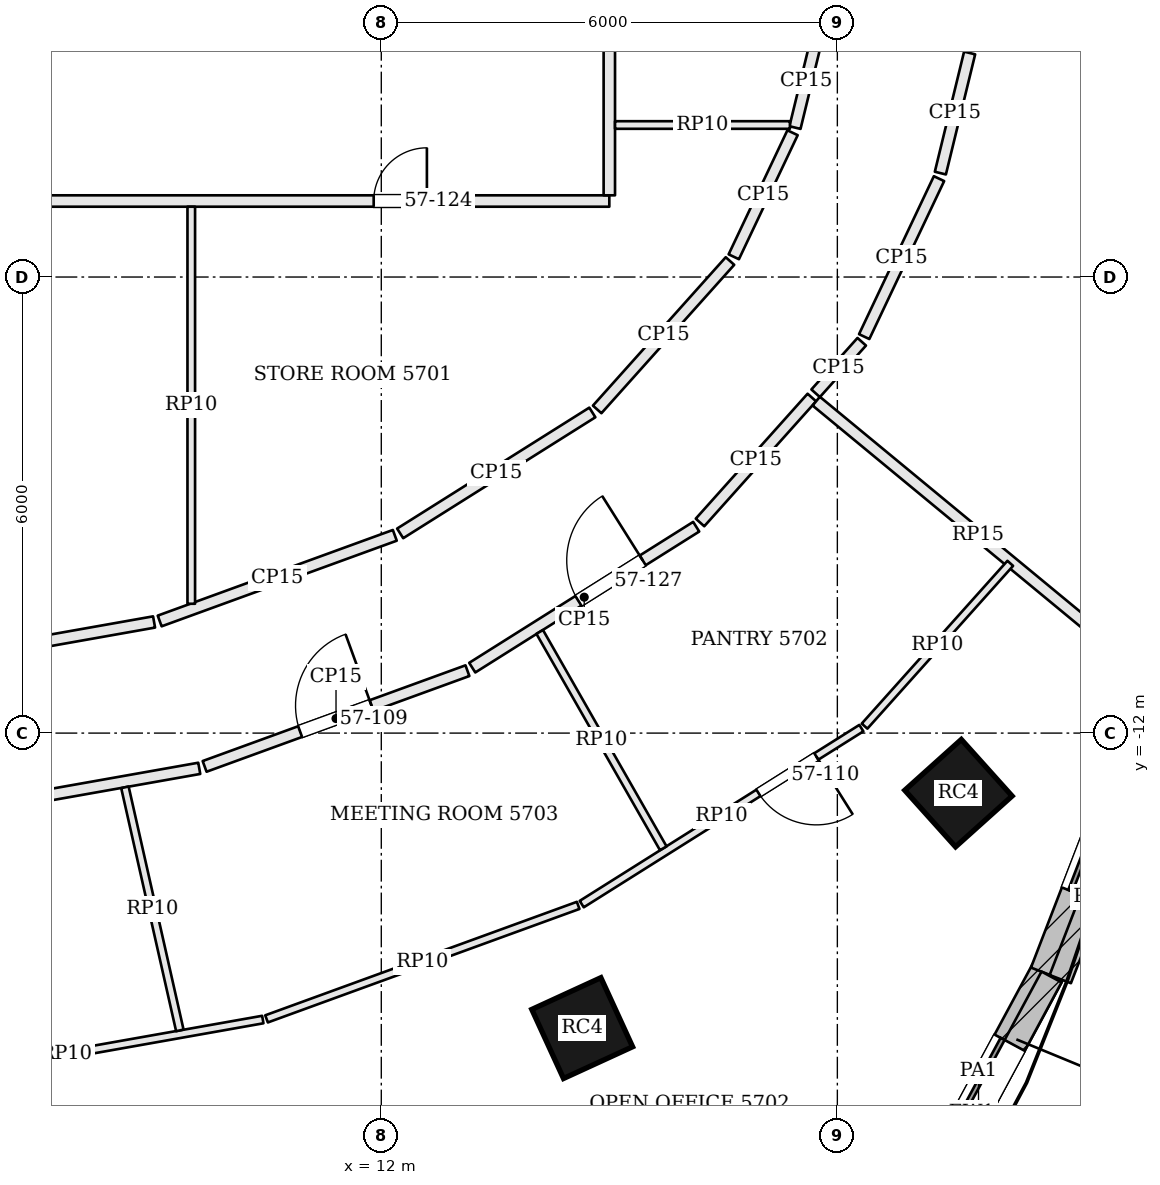
"""IFC4 building model, lengths in metres.
Left out: names, types, materials, properties, quantities, classifications, styles, units other than length and angle.
Written with IfcOpenShell. Run it as: python <this file> out.ifc"""

import sys

from ifc_helpers import new_model, si_unit, direction, frame, frame_2d, origin, origin_2d, place, context, subcontext, project, spatial, rectangle, extrude, element, fill, save


model = new_model("IFC4")
c1 = context("Model", 3, precision=1e-05, world=origin(), true_north=direction((0.0, 1.0)))
c2 = subcontext(c1, "Body", "Model", "MODEL_VIEW")
j1 = project(units=[si_unit("LENGTHUNIT", "METRE"), si_unit("PLANEANGLEUNIT", "RADIAN")], contexts=[c1])
p1 = place(None, origin())
s1 = spatial("IfcSite", under=j1, at=p1, CompositionType="ELEMENT")
p2 = place(p1, origin())
s2 = spatial("IfcBuilding", under=s1, at=p2, CompositionType="ELEMENT")
p3 = place(p2, frame((0.0, 0.0, 233.1)))
s3 = spatial("IfcBuildingStorey", under=s2, at=p3, CompositionType="ELEMENT", Elevation=233.1)
for number, where, z_axis, x_axis in (
    (1, (14.643, -15.881, 0.0), (0.0, 0.0, 1.0), (0.909, 0.417, 0.0)),
    (2, (19.593, -12.79, 0.0), (0.0, 0.0, 1.0), (0.744, 0.668, 0.0)),
):
    element("IfcColumn", number, at=place(p3, frame(where, z_axis=z_axis, x_axis=x_axis)), inside=s3, PredefinedType="COLUMN", context=c2, shape_type="SweptSolid", body=[
        extrude(rectangle(XDim=1.0, YDim=1.0, at=origin_2d()), origin(), (0.0, 0.0, 1.0), 3.9),
    ])
p4 = place(p3, frame((18.767, -18.854, 0.0), z_axis=(0.0, 0.0, 1.0), x_axis=(0.474475888716, 0.880268499395, 0.0)))
e3 = element("IfcWall", 3, at=p4, inside=s3, PredefinedType="SOLIDWALL", context=c2, shape_type="SweptSolid", body=[
    extrude(rectangle(XDim=4.219, YDim=0.45, at=frame_2d((2.11, 0.0))), origin(), (0.0, 0.0, 1.0), 3.7),
])
p5 = place(p4, frame((1.06, 0.0, 0.9)))
e4 = element("IfcOpeningElement", 4, at=p5, cuts=e3, PredefinedType="OPENING", context=c2, shape_type="SweptSolid", body=[
    extrude(rectangle(XDim=2.1, YDim=2.3, at=frame_2d((1.05, 1.15))), frame((0.0, 0.235, 0.0), z_axis=(0.0, -1.0, 0.0), x_axis=(1.0, 0.0, 0.0)), (0.0, 0.0, 1.0), 0.47),
])
p6 = place(p3, frame((20.757, -15.166, 0.0), z_axis=(0.0, 0.0, 1.0), x_axis=(0.360067043581, 0.932926430179, 0.0)))
e5 = element("IfcWall", 5, at=p6, inside=s3, PredefinedType="SOLIDWALL", context=c2, shape_type="SweptSolid", body=[
    extrude(rectangle(XDim=4.36, YDim=0.45, at=frame_2d((2.18, 0.0))), origin(), (0.0, 0.0, 1.0), 3.7),
])
p7 = place(p6, frame((1.13, 0.0, 0.9)))
e6 = element("IfcOpeningElement", 6, at=p7, cuts=e5, PredefinedType="OPENING", context=c2, shape_type="SweptSolid", body=[
    extrude(rectangle(XDim=2.1, YDim=2.3, at=frame_2d((1.05, 1.15))), frame((0.0, 0.235, 0.0), z_axis=(0.0, -1.0, 0.0), x_axis=(1.0, 0.0, 0.0)), (0.0, 0.0, 1.0), 0.47),
])
p8 = place(p3, frame((18.896, -18.773, 3.9), z_axis=(0.0, 0.0, 1.0), x_axis=(0.474444905835, 0.880285198857, 0.0)))
e7 = element("IfcWall", 7, at=p8, inside=s3, PredefinedType="PARAPET", context=c2, shape_type="SweptSolid", body=[
    extrude(rectangle(XDim=4.05, YDim=0.3, at=frame_2d((2.025, 0.0))), origin(), (0.0, 0.0, 1.0), 1.1),
])
p9 = place(p3, frame((20.933, -15.237, 3.9), z_axis=(0.0, 0.0, 1.0), x_axis=(0.360021038217, 0.932944184848, 0.0)))
e8 = element("IfcWall", 8, at=p9, inside=s3, PredefinedType="PARAPET", context=c2, shape_type="SweptSolid", body=[
    extrude(rectangle(XDim=2.323, YDim=0.3, at=frame_2d((1.162, 0.0))), origin(), (0.0, 0.0, 1.0), 1.1),
])
p10 = place(p3, frame((4.995, -13.281, 0.0), z_axis=(0.0, 0.0, 1.0), x_axis=(0.98463411377, 0.174630071865, 0.0)))
e9 = element("IfcWall", 9, at=p10, inside=s3, PredefinedType="PARTITIONING", context=c2, shape_type="SweptSolid", body=[
    extrude(rectangle(XDim=4.682, YDim=0.15, at=frame_2d((2.341, 0.0))), origin(), (0.0, 0.0, 1.0), 3.084),
])
p11 = place(p3, frame((9.676, -12.438, 0.0), z_axis=(0.0, 0.0, 1.0), x_axis=(0.939640289748, 0.342163887461, 0.0)))
e10 = element("IfcWall", 10, at=p11, inside=s3, PredefinedType="PARTITIONING", context=c2, shape_type="SweptSolid", body=[
    extrude(rectangle(XDim=3.68, YDim=0.15, at=frame_2d((1.84, 0.0))), origin(), (0.0, 0.0, 1.0), 3.084),
])
p12 = place(p11, frame((1.337, 0.0, 0.0)))
e11 = element("IfcOpeningElement", 11, at=p12, cuts=e10, PredefinedType="OPENING", context=c2, shape_type="SweptSolid", body=[
    extrude(rectangle(XDim=1.0, YDim=2.4, at=frame_2d((0.5, 1.2))), frame((0.0, 0.085, 0.0), z_axis=(0.0, -1.0, 0.0), x_axis=(1.0, 0.0, 0.0)), (0.0, 0.0, 1.0), 0.17),
])
p13 = place(p3, frame((13.197, -11.139, 0.0), z_axis=(0.0, 0.0, 1.0), x_axis=(0.846390903833, 0.532562144644, 0.0)))
e12 = element("IfcWall", 12, at=p13, inside=s3, PredefinedType="PARTITIONING", context=c2, shape_type="SweptSolid", body=[
    extrude(rectangle(XDim=3.481, YDim=0.15, at=frame_2d((1.741, 0.0))), origin(), (0.0, 0.0, 1.0), 3.084),
])
p14 = place(p13, frame((1.65, 0.0, 0.0)))
e13 = element("IfcOpeningElement", 13, at=p14, cuts=e12, PredefinedType="OPENING", context=c2, shape_type="SweptSolid", body=[
    extrude(rectangle(XDim=1.0, YDim=2.1, at=frame_2d((0.5, 1.05))), frame((0.0, 0.085, 0.0), z_axis=(0.0, -1.0, 0.0), x_axis=(1.0, 0.0, 0.0)), (0.0, 0.0, 1.0), 0.17),
])
p15 = place(p3, frame((16.193, -9.229, 0.0), z_axis=(0.0, 0.0, 1.0), x_axis=(0.666901607283, 0.745145788556, 0.0)))
e14 = element("IfcWall", 14, at=p15, inside=s3, PredefinedType="PARTITIONING", context=c2, shape_type="SweptSolid", body=[
    extrude(rectangle(XDim=2.206, YDim=0.15, at=frame_2d((1.103, 0.0))), origin(), (0.0, 0.0, 1.0), 3.084),
])
p16 = place(p3, frame((21.981, -11.15, 0.0), z_axis=(0.0, 0.0, 1.0), x_axis=(-0.771133462492, 0.63667352939, 0.0)))
e15 = element("IfcWall", 15, at=p16, inside=s3, PredefinedType="PARTITIONING", context=c2, shape_type="SweptSolid", body=[
    extrude(rectangle(XDim=5.523, YDim=0.15, at=frame_2d((2.762, 0.0))), origin(), (0.0, 0.0, 1.0), 3.084),
])
p17 = place(p3, frame((17.714, -7.529, 0.0), z_axis=(0.0, 0.0, 1.0), x_axis=(0.666975287656, 0.745079838444, 0.0)))
e16 = element("IfcWall", 16, at=p17, inside=s3, PredefinedType="PARTITIONING", context=c2, shape_type="SweptSolid", body=[
    extrude(rectangle(XDim=0.91, YDim=0.15, at=frame_2d((0.455, 0.0))), origin(), (0.0, 0.0, 1.0), 3.084),
])
p18 = place(p3, frame((18.353, -6.784, 0.0), z_axis=(0.0, 0.0, 1.0), x_axis=(0.428086344739, 0.903737838894, 0.0)))
e17 = element("IfcWall", 17, at=p18, inside=s3, PredefinedType="PARTITIONING", context=c2, shape_type="SweptSolid", body=[
    extrude(rectangle(XDim=2.3, YDim=0.15, at=frame_2d((1.15, 0.0))), origin(), (0.0, 0.0, 1.0), 3.084),
])
p19 = place(p3, frame((19.355, -4.633, 0.0), z_axis=(0.0, 0.0, 1.0), x_axis=(0.236703930685, 0.971581828359, 0.0)))
e18 = element("IfcWall", 18, at=p19, inside=s3, PredefinedType="PARTITIONING", context=c2, shape_type="SweptSolid", body=[
    extrude(rectangle(XDim=1.626, YDim=0.15, at=frame_2d((0.813, 0.0))), origin(), (0.0, 0.0, 1.0), 3.084),
])
p20 = place(p3, frame((17.739, -2.818, 0.0), z_axis=(0.0, 0.0, 1.0), x_axis=(-0.236884307907, -0.971537865792, 0.0)))
e19 = element("IfcWall", 19, at=p20, inside=s3, PredefinedType="PARTITIONING", context=c2, shape_type="SweptSolid", body=[
    extrude(rectangle(XDim=1.251, YDim=0.15, at=frame_2d((0.625, 0.0))), origin(), (0.0, 0.0, 1.0), 3.084),
])
p21 = place(p3, frame((17.41, -4.102, 0.0), z_axis=(0.0, 0.0, 1.0), x_axis=(-0.428074720318, -0.903743345107, 0.0)))
e20 = element("IfcWall", 20, at=p21, inside=s3, PredefinedType="PARTITIONING", context=c2, shape_type="SweptSolid", body=[
    extrude(rectangle(XDim=1.806, YDim=0.15, at=frame_2d((0.903, 0.0))), origin(), (0.0, 0.0, 1.0), 3.084),
])
p22 = place(p3, frame((16.587, -5.789, 0.0), z_axis=(0.0, 0.0, 1.0), x_axis=(-0.666887460656, -0.745158449472, 0.0)))
e21 = element("IfcWall", 21, at=p22, inside=s3, PredefinedType="PARTITIONING", context=c2, shape_type="SweptSolid", body=[
    extrude(rectangle(XDim=2.62, YDim=0.15, at=frame_2d((1.31, 0.0))), origin(), (0.0, 0.0, 1.0), 3.084),
])
p23 = place(p3, frame((14.777, -7.781, 0.0), z_axis=(0.0, 0.0, 1.0), x_axis=(-0.846359741043, -0.532611667862, 0.0)))
e22 = element("IfcWall", 22, at=p23, inside=s3, PredefinedType="PARTITIONING", context=c2, shape_type="SweptSolid", body=[
    extrude(rectangle(XDim=2.987, YDim=0.15, at=frame_2d((1.494, 0.0))), origin(), (0.0, 0.0, 1.0), 3.084),
])
p24 = place(p3, frame((12.178, -9.398, 0.0), z_axis=(0.0, 0.0, 1.0), x_axis=(-0.939609240084, -0.342249143093, 0.0)))
e23 = element("IfcWall", 23, at=p24, inside=s3, PredefinedType="PARTITIONING", context=c2, shape_type="SweptSolid", body=[
    extrude(rectangle(XDim=3.292, YDim=0.15, at=frame_2d((1.646, 0.0))), origin(), (0.0, 0.0, 1.0), 3.084),
])
p25 = place(p3, frame((9.01, -10.538, 0.0), z_axis=(0.0, 0.0, 1.0), x_axis=(-0.984645638575, -0.174565077936, 0.0)))
e24 = element("IfcWall", 24, at=p25, inside=s3, PredefinedType="PARTITIONING", context=c2, shape_type="SweptSolid", body=[
    extrude(rectangle(XDim=4.358, YDim=0.15, at=frame_2d((2.179, 0.0))), origin(), (0.0, 0.0, 1.0), 3.084),
])
p26 = place(p3, frame((-14.925, -5.0, 0.0), z_axis=(0.0, 0.0, 1.0), x_axis=(1.0, 0.0, 0.0)))
e25 = element("IfcWall", 25, at=p26, inside=s3, PredefinedType="PARTITIONING", context=c2, shape_type="SweptSolid", body=[
    extrude(rectangle(XDim=29.925, YDim=0.15, at=frame_2d((14.962, 0.0))), origin(), (0.0, 0.0, 1.0), 3.084),
])
p27 = place(p26, frame((2.175, 0.0, 0.0)))
e26 = element("IfcOpeningElement", 26, at=p27, cuts=e25, PredefinedType="OPENING", context=c2, shape_type="SweptSolid", body=[
    extrude(rectangle(XDim=1.0, YDim=2.4, at=frame_2d((0.5, 1.2))), frame((0.0, 0.085, 0.0), z_axis=(0.0, -1.0, 0.0), x_axis=(1.0, 0.0, 0.0)), (0.0, 0.0, 1.0), 0.17),
])
p28 = place(p26, frame((14.025, 0.0, 0.0)))
e27 = element("IfcOpeningElement", 27, at=p28, cuts=e25, PredefinedType="OPENING", context=c2, shape_type="SweptSolid", body=[
    extrude(rectangle(XDim=1.8, YDim=2.1, at=frame_2d((0.9, 1.05))), frame((0.0, 0.085, 0.0), z_axis=(0.0, -1.0, 0.0), x_axis=(1.0, 0.0, 0.0)), (0.0, 0.0, 1.0), 0.17),
])
p29 = place(p26, frame((26.825, 0.0, 0.0)))
e28 = element("IfcOpeningElement", 28, at=p29, cuts=e25, PredefinedType="OPENING", context=c2, shape_type="SweptSolid", body=[
    extrude(rectangle(XDim=0.7, YDim=2.1, at=frame_2d((0.35, 1.05))), frame((0.0, 0.085, 0.0), z_axis=(0.0, -1.0, 0.0), x_axis=(1.0, 0.0, 0.0)), (0.0, 0.0, 1.0), 0.17),
])
p30 = place(p3, frame((15.0, -4.925, 0.0), z_axis=(0.0, 0.0, 1.0), x_axis=(0.0, 1.0, 0.0)))
e29 = element("IfcWall", 29, at=p30, inside=s3, PredefinedType="PARTITIONING", context=c2, shape_type="SweptSolid", body=[
    extrude(rectangle(XDim=12.583, YDim=0.15, at=frame_2d((6.292, 0.0))), origin(), (0.0, 0.0, 1.0), 3.084),
])
p31 = place(p30, frame((6.291, 0.0, 0.0)))
e30 = element("IfcOpeningElement", 30, at=p31, cuts=e29, PredefinedType="OPENING", context=c2, shape_type="SweptSolid", body=[
    extrude(rectangle(XDim=1.0, YDim=2.1, at=frame_2d((0.5, 1.05))), frame((0.0, 0.085, 0.0), z_axis=(0.0, -1.0, 0.0), x_axis=(1.0, 0.0, 0.0)), (0.0, 0.0, 1.0), 0.17),
])
p32 = place(p3, frame((20.275, -9.767, 0.0), z_axis=(0.0, 0.0, 1.0), x_axis=(-0.66695374861, -0.745099119054, 0.0)))
e31 = element("IfcWall", 31, at=p32, inside=s3, PredefinedType="PARTITIONING", context=c2, shape_type="SweptSolid", body=[
    extrude(rectangle(XDim=2.874, YDim=0.1, at=frame_2d((1.437, 0.0))), origin(), (0.0, 0.0, 1.0), 3.084),
])
p33 = place(p3, frame((18.316, -11.935, 0.0), z_axis=(0.0, 0.0, 1.0), x_axis=(-0.84637539713, -0.532586788358, 0.0)))
e32 = element("IfcWall", 32, at=p33, inside=s3, PredefinedType="PARTITIONING", context=c2, shape_type="SweptSolid", body=[
    extrude(rectangle(XDim=4.346, YDim=0.1, at=frame_2d((2.173, 0.0))), origin(), (0.0, 0.0, 1.0), 3.084),
])
p34 = place(p33, frame((0.7, 0.0, 0.0)))
e33 = element("IfcOpeningElement", 33, at=p34, cuts=e32, PredefinedType="OPENING", context=c2, shape_type="SweptSolid", body=[
    extrude(rectangle(XDim=0.9, YDim=2.1, at=frame_2d((0.45, 1.05))), frame((0.0, 0.06, 0.0), z_axis=(0.0, -1.0, 0.0), x_axis=(1.0, 0.0, 0.0)), (0.0, 0.0, 1.0), 0.12),
])
p35 = place(p3, frame((14.59, -14.267, 0.0), z_axis=(0.0, 0.0, 1.0), x_axis=(-0.939623405418, -0.342210251148, 0.0)))
e34 = element("IfcWall", 34, at=p35, inside=s3, PredefinedType="PARTITIONING", context=c2, shape_type="SweptSolid", body=[
    extrude(rectangle(XDim=4.363, YDim=0.1, at=frame_2d((2.182, 0.0))), origin(), (0.0, 0.0, 1.0), 3.084),
])
p36 = place(p3, frame((10.441, -15.769, 0.0), z_axis=(0.0, 0.0, 1.0), x_axis=(-0.984642067447, -0.174585219919, 0.0)))
e35 = element("IfcWall", 35, at=p36, inside=s3, PredefinedType="PARTITIONING", context=c2, shape_type="SweptSolid", body=[
    extrude(rectangle(XDim=5.258, YDim=0.1, at=frame_2d((2.629, 0.0))), origin(), (0.0, 0.0, 1.0), 3.084),
])
p37 = place(p3, frame((8.627, -12.713, 0.0), z_axis=(0.0, 0.0, 1.0), x_axis=(0.220343151244, -0.975422419109, 0.0)))
e36 = element("IfcWall", 36, at=p37, inside=s3, PredefinedType="PARTITIONING", context=c2, shape_type="SweptSolid", body=[
    extrude(rectangle(XDim=3.279, YDim=0.1, at=frame_2d((1.639, 0.0))), origin(), (0.0, 0.0, 1.0), 3.084),
])
p38 = place(p3, frame((14.084, -10.669, 0.0), z_axis=(0.0, 0.0, 1.0), x_axis=(0.495922375445, -0.868366856538, 0.0)))
e37 = element("IfcWall", 37, at=p38, inside=s3, PredefinedType="PARTITIONING", context=c2, shape_type="SweptSolid", body=[
    extrude(rectangle(XDim=3.278, YDim=0.1, at=frame_2d((1.639, 0.0))), origin(), (0.0, 0.0, 1.0), 3.084),
])
p39 = place(p3, frame((9.5, -10.299, 0.0), z_axis=(0.0, 0.0, 1.0), x_axis=(0.0, 1.0, 0.0)))
e38 = element("IfcWall", 38, at=p39, inside=s3, PredefinedType="PARTITIONING", context=c2, shape_type="SweptSolid", body=[
    extrude(rectangle(XDim=5.224, YDim=0.1, at=frame_2d((2.612, 0.0))), origin(), (0.0, 0.0, 1.0), 3.084),
])
p40 = place(p3, frame((15.075, -4.0, 0.0), z_axis=(0.0, 0.0, 1.0), x_axis=(1.0, 0.0, 0.0)))
e39 = element("IfcWall", 39, at=p40, inside=s3, PredefinedType="PARTITIONING", context=c2, shape_type="SweptSolid", body=[
    extrude(rectangle(XDim=2.301, YDim=0.1, at=frame_2d((1.15, 0.0))), origin(), (0.0, 0.0, 1.0), 3.084),
])
p41 = place(p5, origin())
e40 = element("IfcWindow", 40, at=p41, inside=s3, PartitioningType="SINGLE_PANEL", PredefinedType="WINDOW", context=c2, shape_type="SweptSolid", body=[
    extrude(rectangle(XDim=2.1, YDim=2.3, at=frame_2d((1.05, 1.15))), frame((0.0, 0.135, 0.0), z_axis=(0.0, -1.0, 0.0), x_axis=(1.0, 0.0, 0.0)), (0.0, 0.0, 1.0), 0.06),
])
fill(e4, e40)
p42 = place(p7, origin())
e41 = element("IfcWindow", 41, at=p42, inside=s3, PartitioningType="SINGLE_PANEL", PredefinedType="WINDOW", context=c2, shape_type="SweptSolid", body=[
    extrude(rectangle(XDim=2.1, YDim=2.3, at=frame_2d((1.05, 1.15))), frame((0.0, 0.135, 0.0), z_axis=(0.0, -1.0, 0.0), x_axis=(1.0, 0.0, 0.0)), (0.0, 0.0, 1.0), 0.06),
])
fill(e6, e41)
p43 = place(p12, origin())
e42 = element("IfcDoor", 42, at=p43, inside=s3, OperationType="SINGLE_SWING_RIGHT", PredefinedType="DOOR", context=c2, shape_type="SweptSolid", body=[
    extrude(rectangle(XDim=1.0, YDim=2.4, at=frame_2d((0.5, 1.2))), frame((0.0, 0.025, 0.0), z_axis=(0.0, -1.0, 0.0), x_axis=(1.0, 0.0, 0.0)), (0.0, 0.0, 1.0), 0.05),
])
fill(e11, e42)
p44 = place(p34, origin())
e43 = element("IfcDoor", 43, at=p44, inside=s3, OperationType="SINGLE_SWING_LEFT", PredefinedType="DOOR", context=c2, shape_type="SweptSolid", body=[
    extrude(rectangle(XDim=0.9, YDim=2.1, at=frame_2d((0.45, 1.05))), frame((0.0, 0.025, 0.0), z_axis=(0.0, -1.0, 0.0), x_axis=(1.0, 0.0, 0.0)), (0.0, 0.0, 1.0), 0.05),
])
fill(e33, e43)
p45 = place(p29, origin())
e44 = element("IfcDoor", 44, at=p45, inside=s3, OperationType="SINGLE_SWING_RIGHT", PredefinedType="DOOR", context=c2, shape_type="SweptSolid", body=[
    extrude(rectangle(XDim=0.7, YDim=2.1, at=frame_2d((0.35, 1.05))), frame((0.0, 0.025, 0.0), z_axis=(0.0, -1.0, 0.0), x_axis=(1.0, 0.0, 0.0)), (0.0, 0.0, 1.0), 0.05),
])
fill(e28, e44)
p46 = place(p14, origin())
e45 = element("IfcDoor", 45, at=p46, inside=s3, OperationType="SINGLE_SWING_RIGHT", PredefinedType="DOOR", context=c2, shape_type="SweptSolid", body=[
    extrude(rectangle(XDim=1.0, YDim=2.1, at=frame_2d((0.5, 1.05))), frame((0.0, 0.025, 0.0), z_axis=(0.0, -1.0, 0.0), x_axis=(1.0, 0.0, 0.0)), (0.0, 0.0, 1.0), 0.05),
])
fill(e13, e45)
save(model, sys.argv[1])
